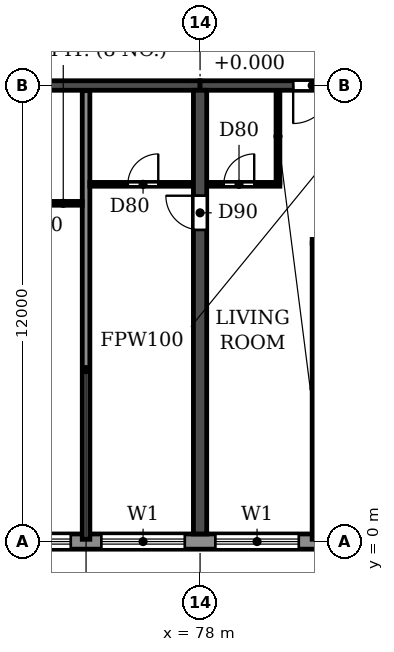
"""IFC4 building model, lengths in metres.
Left out: names, types, materials, properties, quantities, classifications, styles, units other than length and angle.
Written with IfcOpenShell. Run it as: python <this file> out.ifc"""

import sys

from ifc_helpers import new_model, si_unit, direction, frame, frame_2d, origin, place, context, subcontext, project, spatial, rectangle, extrude, element, fill, save


model = new_model("IFC4")
c1 = context("Model", 3, precision=1e-05, world=origin(), true_north=direction((0.0, 1.0)))
c2 = subcontext(c1, "Body", "Model", "MODEL_VIEW")
j1 = project(units=[si_unit("LENGTHUNIT", "METRE"), si_unit("PLANEANGLEUNIT", "RADIAN")], contexts=[c1])
p1 = place(None, origin())
s1 = spatial("IfcSite", under=j1, at=p1, CompositionType="ELEMENT")
p2 = place(p1, origin())
s2 = spatial("IfcBuilding", under=s1, at=p2, CompositionType="ELEMENT")
p3 = place(p2, frame((0.0, 0.0, 102.6)))
s3 = spatial("IfcBuildingStorey", under=s2, at=p3, CompositionType="ELEMENT", Elevation=102.6)
p4 = place(p3, frame((78.0, 0.2, 0.0), z_axis=(0.0, 0.0, 1.0), x_axis=(0.0, 1.0, 0.0)))
e1 = element("IfcWall", 1, at=p4, inside=s3, PredefinedType="SHEAR", context=c2, shape_type="SweptSolid", body=[
    extrude(rectangle(XDim=11.675, YDim=0.35, at=frame_2d((5.837, 0.0))), origin(), (0.0, 0.0, 1.0), 3.0),
])
p5 = place(p4, frame((8.0, 0.0, 0.0)))
e2 = element("IfcOpeningElement", 2, at=p5, cuts=e1, PredefinedType="OPENING", context=c2, shape_type="SweptSolid", body=[
    extrude(rectangle(XDim=0.9, YDim=2.1, at=frame_2d((0.45, 1.05))), frame((0.0, 0.185, 0.0), z_axis=(0.0, -1.0, 0.0), x_axis=(1.0, 0.0, 0.0)), (0.0, 0.0, 1.0), 0.37),
])
p6 = place(p3, frame((72.0, 12.0, 0.0), z_axis=(0.0, 0.0, 1.0), x_axis=(1.0, 0.0, 0.0)))
e3 = element("IfcWall", 3, at=p6, inside=s3, PredefinedType="SHEAR", context=c2, shape_type="SweptSolid", body=[
    extrude(rectangle(XDim=6.0, YDim=0.25, at=frame_2d((3.0, 0.0))), origin(), (0.0, 0.0, 1.0), 2.4),
])
p7 = place(p3, frame((78.0, 12.0, 0.0), z_axis=(0.0, 0.0, 1.0), x_axis=(1.0, 0.0, 0.0)))
e4 = element("IfcWall", 4, at=p7, inside=s3, PredefinedType="SHEAR", context=c2, shape_type="SweptSolid", body=[
    extrude(rectangle(XDim=6.0, YDim=0.25, at=frame_2d((3.0, 0.0))), origin(), (0.0, 0.0, 1.0), 2.4),
])
p8 = place(p7, frame((2.45, 0.0, 0.0)))
e5 = element("IfcOpeningElement", 5, at=p8, cuts=e4, PredefinedType="OPENING", context=c2, shape_type="SweptSolid", body=[
    extrude(rectangle(XDim=1.0, YDim=2.1, at=frame_2d((0.5, 1.05))), frame((0.0, 0.135, 0.0), z_axis=(0.0, -1.0, 0.0), x_axis=(1.0, 0.0, 0.0)), (0.0, 0.0, 1.0), 0.27),
])
p9 = place(p3, frame((10.683, 0.0, 0.0), z_axis=(0.0, 0.0, 1.0), x_axis=(1.0, 0.0, 0.0)))
e6 = element("IfcWall", 6, at=p9, inside=s3, PredefinedType="STANDARD", context=c2, shape_type="SweptSolid", body=[
    extrude(rectangle(XDim=80.634, YDim=0.4, at=frame_2d((40.317, 0.0))), origin(), (0.0, 0.0, 1.0), 3.0),
])
p10 = place(p9, frame((1.717, 0.0, 0.9)))
e7 = element("IfcOpeningElement", 7, at=p10, cuts=e6, PredefinedType="OPENING", context=c2, shape_type="SweptSolid", body=[
    extrude(rectangle(XDim=2.2, YDim=1.5, at=frame_2d((1.1, 0.75))), frame((0.0, 0.21, 0.0), z_axis=(0.0, -1.0, 0.0), x_axis=(1.0, 0.0, 0.0)), (0.0, 0.0, 1.0), 0.42),
])
p11 = place(p9, frame((4.917, 0.0, 0.0)))
e8 = element("IfcOpeningElement", 8, at=p11, cuts=e6, PredefinedType="OPENING", context=c2, shape_type="SweptSolid", body=[
    extrude(rectangle(XDim=1.8, YDim=2.4, at=frame_2d((0.9, 1.2))), frame((0.0, 0.21, 0.0), z_axis=(0.0, -1.0, 0.0), x_axis=(1.0, 0.0, 0.0)), (0.0, 0.0, 1.0), 0.42),
])
p12 = place(p9, frame((7.717, 0.0, 0.9)))
e9 = element("IfcOpeningElement", 9, at=p12, cuts=e6, PredefinedType="OPENING", context=c2, shape_type="SweptSolid", body=[
    extrude(rectangle(XDim=2.2, YDim=1.5, at=frame_2d((1.1, 0.75))), frame((0.0, 0.21, 0.0), z_axis=(0.0, -1.0, 0.0), x_axis=(1.0, 0.0, 0.0)), (0.0, 0.0, 1.0), 0.42),
])
p13 = place(p9, frame((10.717, 0.0, 0.9)))
e10 = element("IfcOpeningElement", 10, at=p13, cuts=e6, PredefinedType="OPENING", context=c2, shape_type="SweptSolid", body=[
    extrude(rectangle(XDim=2.2, YDim=1.5, at=frame_2d((1.1, 0.75))), frame((0.0, 0.21, 0.0), z_axis=(0.0, -1.0, 0.0), x_axis=(1.0, 0.0, 0.0)), (0.0, 0.0, 1.0), 0.42),
])
p14 = place(p9, frame((13.717, 0.0, 0.9)))
e11 = element("IfcOpeningElement", 11, at=p14, cuts=e6, PredefinedType="OPENING", context=c2, shape_type="SweptSolid", body=[
    extrude(rectangle(XDim=2.2, YDim=1.5, at=frame_2d((1.1, 0.75))), frame((0.0, 0.21, 0.0), z_axis=(0.0, -1.0, 0.0), x_axis=(1.0, 0.0, 0.0)), (0.0, 0.0, 1.0), 0.42),
])
p15 = place(p9, frame((16.717, 0.0, 0.9)))
e12 = element("IfcOpeningElement", 12, at=p15, cuts=e6, PredefinedType="OPENING", context=c2, shape_type="SweptSolid", body=[
    extrude(rectangle(XDim=2.2, YDim=1.5, at=frame_2d((1.1, 0.75))), frame((0.0, 0.21, 0.0), z_axis=(0.0, -1.0, 0.0), x_axis=(1.0, 0.0, 0.0)), (0.0, 0.0, 1.0), 0.42),
])
p16 = place(p9, frame((19.717, 0.0, 0.9)))
e13 = element("IfcOpeningElement", 13, at=p16, cuts=e6, PredefinedType="OPENING", context=c2, shape_type="SweptSolid", body=[
    extrude(rectangle(XDim=2.2, YDim=1.5, at=frame_2d((1.1, 0.75))), frame((0.0, 0.21, 0.0), z_axis=(0.0, -1.0, 0.0), x_axis=(1.0, 0.0, 0.0)), (0.0, 0.0, 1.0), 0.42),
])
p17 = place(p9, frame((22.717, 0.0, 0.9)))
e14 = element("IfcOpeningElement", 14, at=p17, cuts=e6, PredefinedType="OPENING", context=c2, shape_type="SweptSolid", body=[
    extrude(rectangle(XDim=2.2, YDim=1.5, at=frame_2d((1.1, 0.75))), frame((0.0, 0.21, 0.0), z_axis=(0.0, -1.0, 0.0), x_axis=(1.0, 0.0, 0.0)), (0.0, 0.0, 1.0), 0.42),
])
p18 = place(p9, frame((25.717, 0.0, 0.9)))
e15 = element("IfcOpeningElement", 15, at=p18, cuts=e6, PredefinedType="OPENING", context=c2, shape_type="SweptSolid", body=[
    extrude(rectangle(XDim=2.2, YDim=1.5, at=frame_2d((1.1, 0.75))), frame((0.0, 0.21, 0.0), z_axis=(0.0, -1.0, 0.0), x_axis=(1.0, 0.0, 0.0)), (0.0, 0.0, 1.0), 0.42),
])
p19 = place(p9, frame((28.917, 0.0, 0.0)))
e16 = element("IfcOpeningElement", 16, at=p19, cuts=e6, PredefinedType="OPENING", context=c2, shape_type="SweptSolid", body=[
    extrude(rectangle(XDim=1.8, YDim=2.4, at=frame_2d((0.9, 1.2))), frame((0.0, 0.21, 0.0), z_axis=(0.0, -1.0, 0.0), x_axis=(1.0, 0.0, 0.0)), (0.0, 0.0, 1.0), 0.42),
])
p20 = place(p9, frame((31.717, 0.0, 0.9)))
e17 = element("IfcOpeningElement", 17, at=p20, cuts=e6, PredefinedType="OPENING", context=c2, shape_type="SweptSolid", body=[
    extrude(rectangle(XDim=2.2, YDim=1.5, at=frame_2d((1.1, 0.75))), frame((0.0, 0.21, 0.0), z_axis=(0.0, -1.0, 0.0), x_axis=(1.0, 0.0, 0.0)), (0.0, 0.0, 1.0), 0.42),
])
p21 = place(p9, frame((34.717, 0.0, 0.9)))
e18 = element("IfcOpeningElement", 18, at=p21, cuts=e6, PredefinedType="OPENING", context=c2, shape_type="SweptSolid", body=[
    extrude(rectangle(XDim=2.2, YDim=1.5, at=frame_2d((1.1, 0.75))), frame((0.0, 0.21, 0.0), z_axis=(0.0, -1.0, 0.0), x_axis=(1.0, 0.0, 0.0)), (0.0, 0.0, 1.0), 0.42),
])
p22 = place(p9, frame((37.717, 0.0, 0.9)))
e19 = element("IfcOpeningElement", 19, at=p22, cuts=e6, PredefinedType="OPENING", context=c2, shape_type="SweptSolid", body=[
    extrude(rectangle(XDim=2.2, YDim=1.5, at=frame_2d((1.1, 0.75))), frame((0.0, 0.21, 0.0), z_axis=(0.0, -1.0, 0.0), x_axis=(1.0, 0.0, 0.0)), (0.0, 0.0, 1.0), 0.42),
])
p23 = place(p9, frame((40.717, 0.0, 0.9)))
e20 = element("IfcOpeningElement", 20, at=p23, cuts=e6, PredefinedType="OPENING", context=c2, shape_type="SweptSolid", body=[
    extrude(rectangle(XDim=2.2, YDim=1.5, at=frame_2d((1.1, 0.75))), frame((0.0, 0.21, 0.0), z_axis=(0.0, -1.0, 0.0), x_axis=(1.0, 0.0, 0.0)), (0.0, 0.0, 1.0), 0.42),
])
p24 = place(p9, frame((43.717, 0.0, 0.9)))
e21 = element("IfcOpeningElement", 21, at=p24, cuts=e6, PredefinedType="OPENING", context=c2, shape_type="SweptSolid", body=[
    extrude(rectangle(XDim=2.2, YDim=1.5, at=frame_2d((1.1, 0.75))), frame((0.0, 0.21, 0.0), z_axis=(0.0, -1.0, 0.0), x_axis=(1.0, 0.0, 0.0)), (0.0, 0.0, 1.0), 0.42),
])
p25 = place(p9, frame((46.717, 0.0, 0.9)))
e22 = element("IfcOpeningElement", 22, at=p25, cuts=e6, PredefinedType="OPENING", context=c2, shape_type="SweptSolid", body=[
    extrude(rectangle(XDim=2.2, YDim=1.5, at=frame_2d((1.1, 0.75))), frame((0.0, 0.21, 0.0), z_axis=(0.0, -1.0, 0.0), x_axis=(1.0, 0.0, 0.0)), (0.0, 0.0, 1.0), 0.42),
])
p26 = place(p9, frame((49.917, 0.0, 0.0)))
e23 = element("IfcOpeningElement", 23, at=p26, cuts=e6, PredefinedType="OPENING", context=c2, shape_type="SweptSolid", body=[
    extrude(rectangle(XDim=1.8, YDim=2.4, at=frame_2d((0.9, 1.2))), frame((0.0, 0.21, 0.0), z_axis=(0.0, -1.0, 0.0), x_axis=(1.0, 0.0, 0.0)), (0.0, 0.0, 1.0), 0.42),
])
p27 = place(p9, frame((52.717, 0.0, 0.9)))
e24 = element("IfcOpeningElement", 24, at=p27, cuts=e6, PredefinedType="OPENING", context=c2, shape_type="SweptSolid", body=[
    extrude(rectangle(XDim=2.2, YDim=1.5, at=frame_2d((1.1, 0.75))), frame((0.0, 0.21, 0.0), z_axis=(0.0, -1.0, 0.0), x_axis=(1.0, 0.0, 0.0)), (0.0, 0.0, 1.0), 0.42),
])
p28 = place(p9, frame((55.717, 0.0, 0.9)))
e25 = element("IfcOpeningElement", 25, at=p28, cuts=e6, PredefinedType="OPENING", context=c2, shape_type="SweptSolid", body=[
    extrude(rectangle(XDim=2.2, YDim=1.5, at=frame_2d((1.1, 0.75))), frame((0.0, 0.21, 0.0), z_axis=(0.0, -1.0, 0.0), x_axis=(1.0, 0.0, 0.0)), (0.0, 0.0, 1.0), 0.42),
])
p29 = place(p9, frame((58.717, 0.0, 0.9)))
e26 = element("IfcOpeningElement", 26, at=p29, cuts=e6, PredefinedType="OPENING", context=c2, shape_type="SweptSolid", body=[
    extrude(rectangle(XDim=2.2, YDim=1.5, at=frame_2d((1.1, 0.75))), frame((0.0, 0.21, 0.0), z_axis=(0.0, -1.0, 0.0), x_axis=(1.0, 0.0, 0.0)), (0.0, 0.0, 1.0), 0.42),
])
p30 = place(p9, frame((61.717, 0.0, 0.9)))
e27 = element("IfcOpeningElement", 27, at=p30, cuts=e6, PredefinedType="OPENING", context=c2, shape_type="SweptSolid", body=[
    extrude(rectangle(XDim=2.2, YDim=1.5, at=frame_2d((1.1, 0.75))), frame((0.0, 0.21, 0.0), z_axis=(0.0, -1.0, 0.0), x_axis=(1.0, 0.0, 0.0)), (0.0, 0.0, 1.0), 0.42),
])
p31 = place(p9, frame((64.717, 0.0, 0.9)))
e28 = element("IfcOpeningElement", 28, at=p31, cuts=e6, PredefinedType="OPENING", context=c2, shape_type="SweptSolid", body=[
    extrude(rectangle(XDim=2.2, YDim=1.5, at=frame_2d((1.1, 0.75))), frame((0.0, 0.21, 0.0), z_axis=(0.0, -1.0, 0.0), x_axis=(1.0, 0.0, 0.0)), (0.0, 0.0, 1.0), 0.42),
])
p32 = place(p9, frame((67.717, 0.0, 0.9)))
e29 = element("IfcOpeningElement", 29, at=p32, cuts=e6, PredefinedType="OPENING", context=c2, shape_type="SweptSolid", body=[
    extrude(rectangle(XDim=2.2, YDim=1.5, at=frame_2d((1.1, 0.75))), frame((0.0, 0.21, 0.0), z_axis=(0.0, -1.0, 0.0), x_axis=(1.0, 0.0, 0.0)), (0.0, 0.0, 1.0), 0.42),
])
p33 = place(p9, frame((70.717, 0.0, 0.9)))
e30 = element("IfcOpeningElement", 30, at=p33, cuts=e6, PredefinedType="OPENING", context=c2, shape_type="SweptSolid", body=[
    extrude(rectangle(XDim=2.2, YDim=1.5, at=frame_2d((1.1, 0.75))), frame((0.0, 0.21, 0.0), z_axis=(0.0, -1.0, 0.0), x_axis=(1.0, 0.0, 0.0)), (0.0, 0.0, 1.0), 0.42),
])
p34 = place(p9, frame((73.717, 0.0, 0.9)))
e31 = element("IfcOpeningElement", 31, at=p34, cuts=e6, PredefinedType="OPENING", context=c2, shape_type="SweptSolid", body=[
    extrude(rectangle(XDim=2.2, YDim=1.5, at=frame_2d((1.1, 0.75))), frame((0.0, 0.21, 0.0), z_axis=(0.0, -1.0, 0.0), x_axis=(1.0, 0.0, 0.0)), (0.0, 0.0, 1.0), 0.42),
])
p35 = place(p9, frame((76.917, 0.0, 0.0)))
e32 = element("IfcOpeningElement", 32, at=p35, cuts=e6, PredefinedType="OPENING", context=c2, shape_type="SweptSolid", body=[
    extrude(rectangle(XDim=1.8, YDim=2.4, at=frame_2d((0.9, 1.2))), frame((0.0, 0.21, 0.0), z_axis=(0.0, -1.0, 0.0), x_axis=(1.0, 0.0, 0.0)), (0.0, 0.0, 1.0), 0.42),
])
p36 = place(p3, frame((75.0, 0.06, 0.0), z_axis=(0.0, 0.0, 1.0), x_axis=(0.0, 1.0, 0.0)))
e33 = element("IfcWall", 33, at=p36, inside=s3, PredefinedType="PARTITIONING", context=c2, shape_type="SweptSolid", body=[
    extrude(rectangle(XDim=11.805, YDim=0.2, at=frame_2d((5.902, 0.0))), origin(), (0.0, 0.0, 1.0), 3.0),
])
p37 = place(p3, frame((80.95, 7.9, 0.0), z_axis=(0.0, 0.0, 1.0), x_axis=(1.0, 0.0, 0.0)))
e34 = element("IfcWall", 34, at=p37, inside=s3, PredefinedType="PARTITIONING", context=c2, shape_type="SweptSolid", body=[
    extrude(rectangle(XDim=2.865, YDim=0.1, at=frame_2d((1.433, 0.0))), origin(), (0.0, 0.0, 1.0), 3.0),
])
p38 = place(p37, frame((0.55, 0.0, 0.0)))
e35 = element("IfcOpeningElement", 35, at=p38, cuts=e34, PredefinedType="OPENING", context=c2, shape_type="SweptSolid", body=[
    extrude(rectangle(XDim=0.9, YDim=2.1, at=frame_2d((0.45, 1.05))), frame((0.0, 0.06, 0.0), z_axis=(0.0, -1.0, 0.0), x_axis=(1.0, 0.0, 0.0)), (0.0, 0.0, 1.0), 0.12),
])
p39 = place(p3, frame((72.185, 8.9, 0.0), z_axis=(0.0, 0.0, 1.0), x_axis=(1.0, 0.0, 0.0)))
e36 = element("IfcWall", 36, at=p39, inside=s3, PredefinedType="PARTITIONING", context=c2, shape_type="SweptSolid", body=[
    extrude(rectangle(XDim=2.715, YDim=0.1, at=frame_2d((1.357, 0.0))), origin(), (0.0, 0.0, 1.0), 3.0),
])
p40 = place(p39, frame((0.915, 0.0, 0.0)))
e37 = element("IfcOpeningElement", 37, at=p40, cuts=e36, PredefinedType="OPENING", context=c2, shape_type="SweptSolid", body=[
    extrude(rectangle(XDim=0.8, YDim=2.1, at=frame_2d((0.4, 1.05))), frame((0.0, 0.06, 0.0), z_axis=(0.0, -1.0, 0.0), x_axis=(1.0, 0.0, 0.0)), (0.0, 0.0, 1.0), 0.12),
])
p41 = place(p3, frame((75.1, 9.4, 0.0), z_axis=(0.0, 0.0, 1.0), x_axis=(1.0, 0.0, 0.0)))
e38 = element("IfcWall", 38, at=p41, inside=s3, PredefinedType="PARTITIONING", context=c2, shape_type="SweptSolid", body=[
    extrude(rectangle(XDim=2.715, YDim=0.1, at=frame_2d((1.357, 0.0))), origin(), (0.0, 0.0, 1.0), 3.0),
])
p42 = place(p41, frame((1.0, 0.0, 0.0)))
e39 = element("IfcOpeningElement", 39, at=p42, cuts=e38, PredefinedType="OPENING", context=c2, shape_type="SweptSolid", body=[
    extrude(rectangle(XDim=0.8, YDim=2.1, at=frame_2d((0.4, 1.05))), frame((0.0, 0.06, 0.0), z_axis=(0.0, -1.0, 0.0), x_axis=(1.0, 0.0, 0.0)), (0.0, 0.0, 1.0), 0.12),
])
p43 = place(p3, frame((78.185, 9.4, 0.0), z_axis=(0.0, 0.0, 1.0), x_axis=(1.0, 0.0, 0.0)))
e40 = element("IfcWall", 40, at=p43, inside=s3, PredefinedType="PARTITIONING", context=c2, shape_type="SweptSolid", body=[
    extrude(rectangle(XDim=1.915, YDim=0.1, at=frame_2d((0.958, 0.0))), origin(), (0.0, 0.0, 1.0), 3.0),
])
p44 = place(p43, frame((0.44, 0.0, 0.0)))
e41 = element("IfcOpeningElement", 41, at=p44, cuts=e40, PredefinedType="OPENING", context=c2, shape_type="SweptSolid", body=[
    extrude(rectangle(XDim=0.8, YDim=2.1, at=frame_2d((0.4, 1.05))), frame((0.0, 0.06, 0.0), z_axis=(0.0, -1.0, 0.0), x_axis=(1.0, 0.0, 0.0)), (0.0, 0.0, 1.0), 0.12),
])
p45 = place(p3, frame((80.05, 9.45, 0.0), z_axis=(0.0, 0.0, 1.0), x_axis=(0.0, 1.0, 0.0)))
e42 = element("IfcWall", 42, at=p45, inside=s3, PredefinedType="PARTITIONING", context=c2, shape_type="SweptSolid", body=[
    extrude(rectangle(XDim=2.415, YDim=0.1, at=frame_2d((1.208, 0.0))), origin(), (0.0, 0.0, 1.0), 3.0),
])
p46 = place(p3, frame((81.0, 0.06, 0.0), z_axis=(0.0, 0.0, 1.0), x_axis=(0.0, 1.0, 0.0)))
e43 = element("IfcWall", 43, at=p46, inside=s3, PredefinedType="PARTITIONING", context=c2, shape_type="SweptSolid", body=[
    extrude(rectangle(XDim=7.79, YDim=0.1, at=frame_2d((3.895, 0.0))), origin(), (0.0, 0.0, 1.0), 3.0),
])
p47 = place(p30, origin())
e44 = element("IfcWindow", 44, at=p47, inside=s3, PartitioningType="DOUBLE_PANEL_HORIZONTAL", PredefinedType="WINDOW", context=c2, shape_type="SweptSolid", body=[
    extrude(rectangle(XDim=2.2, YDim=1.5, at=frame_2d((1.1, 0.75))), frame((0.0, 0.03, 0.0), z_axis=(0.0, -1.0, 0.0), x_axis=(1.0, 0.0, 0.0)), (0.0, 0.0, 1.0), 0.06),
])
fill(e27, e44)
p48 = place(p31, origin())
e45 = element("IfcWindow", 45, at=p48, inside=s3, PartitioningType="DOUBLE_PANEL_HORIZONTAL", PredefinedType="WINDOW", context=c2, shape_type="SweptSolid", body=[
    extrude(rectangle(XDim=2.2, YDim=1.5, at=frame_2d((1.1, 0.75))), frame((0.0, 0.03, 0.0), z_axis=(0.0, -1.0, 0.0), x_axis=(1.0, 0.0, 0.0)), (0.0, 0.0, 1.0), 0.06),
])
fill(e28, e45)
p49 = place(p32, origin())
e46 = element("IfcWindow", 46, at=p49, inside=s3, PartitioningType="DOUBLE_PANEL_HORIZONTAL", PredefinedType="WINDOW", context=c2, shape_type="SweptSolid", body=[
    extrude(rectangle(XDim=2.2, YDim=1.5, at=frame_2d((1.1, 0.75))), frame((0.0, 0.03, 0.0), z_axis=(0.0, -1.0, 0.0), x_axis=(1.0, 0.0, 0.0)), (0.0, 0.0, 1.0), 0.06),
])
fill(e29, e46)
p50 = place(p42, origin())
e47 = element("IfcDoor", 47, at=p50, inside=s3, OperationType="SINGLE_SWING_RIGHT", PredefinedType="DOOR", context=c2, shape_type="SweptSolid", body=[
    extrude(rectangle(XDim=0.8, YDim=2.1, at=frame_2d((0.4, 1.05))), frame((0.0, 0.025, 0.0), z_axis=(0.0, -1.0, 0.0), x_axis=(1.0, 0.0, 0.0)), (0.0, 0.0, 1.0), 0.05),
])
fill(e39, e47)
p51 = place(p5, origin())
e48 = element("IfcDoor", 48, at=p51, inside=s3, OperationType="SINGLE_SWING_RIGHT", PredefinedType="DOOR", context=c2, shape_type="SweptSolid", body=[
    extrude(rectangle(XDim=0.9, YDim=2.1, at=frame_2d((0.45, 1.05))), frame((0.0, 0.025, 0.0), z_axis=(0.0, -1.0, 0.0), x_axis=(1.0, 0.0, 0.0)), (0.0, 0.0, 1.0), 0.05),
])
fill(e2, e48)
p52 = place(p44, origin())
e49 = element("IfcDoor", 49, at=p52, inside=s3, OperationType="SINGLE_SWING_RIGHT", PredefinedType="DOOR", context=c2, shape_type="SweptSolid", body=[
    extrude(rectangle(XDim=0.8, YDim=2.1, at=frame_2d((0.4, 1.05))), frame((0.0, 0.025, 0.0), z_axis=(0.0, -1.0, 0.0), x_axis=(1.0, 0.0, 0.0)), (0.0, 0.0, 1.0), 0.05),
])
fill(e41, e49)
p53 = place(p8, frame((1.0, 0.0, 0.0), z_axis=(0.0, 0.0, 1.0), x_axis=(-1.0, 0.0, 0.0)))
e50 = element("IfcDoor", 50, at=p53, inside=s3, OperationType="SINGLE_SWING_RIGHT", PredefinedType="DOOR", context=c2, shape_type="SweptSolid", body=[
    extrude(rectangle(XDim=1.0, YDim=2.1, at=frame_2d((0.5, 1.05))), frame((0.0, 0.025, 0.0), z_axis=(0.0, -1.0, 0.0), x_axis=(1.0, 0.0, 0.0)), (0.0, 0.0, 1.0), 0.05),
])
fill(e5, e50)
save(model, sys.argv[1])
